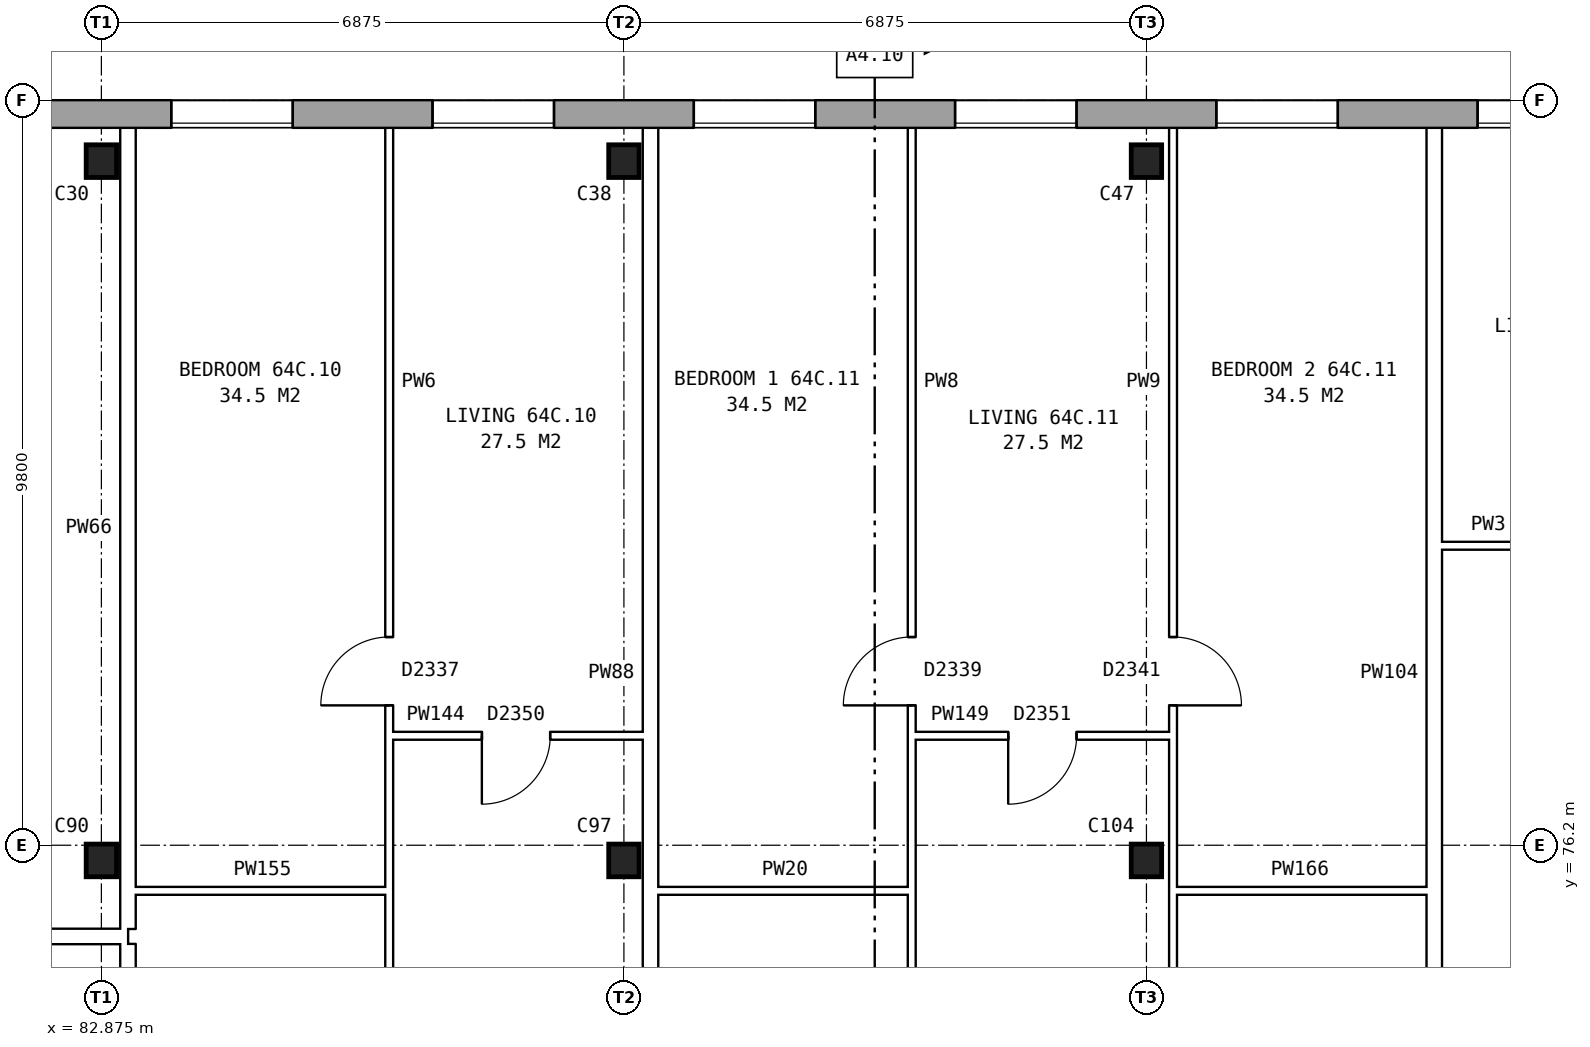
"""IFC4 building model, lengths in metres.
Left out: names, types, materials, properties, quantities, classifications, styles, units other than length and angle.
Written with IfcOpenShell. Run it as: python <this file> out.ifc"""

import sys

from ifc_helpers import new_model, si_unit, direction, frame, frame_2d, origin, origin_2d, place, context, subcontext, project, spatial, rectangle, i_section, extrude, element, fill, save


model = new_model("IFC4")
c1 = context("Model", 3, precision=1e-05, world=origin(), true_north=direction((0.0, 1.0)))
c2 = subcontext(c1, "Body", "Model", "MODEL_VIEW")
j1 = project(units=[si_unit("LENGTHUNIT", "METRE"), si_unit("PLANEANGLEUNIT", "RADIAN")], contexts=[c1])
p1 = place(None, origin())
s1 = spatial("IfcSite", under=j1, at=p1, CompositionType="ELEMENT")
p2 = place(p1, origin())
s2 = spatial("IfcBuilding", under=s1, at=p2, CompositionType="ELEMENT")
p3 = place(p2, frame((0.0, 0.0, 227.6)))
s3 = spatial("IfcBuildingStorey", under=s2, at=p3, CompositionType="ELEMENT", Elevation=227.6)
for number, where, z_axis, x_axis in (
    (1, (82.875, 76.0, 0.0), (0.0, 0.0, 1.0), (1.0, 0.0, 0.0)),
    (2, (89.75, 76.0, 0.0), (0.0, 0.0, 1.0), (1.0, 0.0, 0.0)),
    (3, (96.625, 76.0, 0.0), (0.0, 0.0, 1.0), (1.0, 0.0, 0.0)),
    (4, (82.875, 85.2, 0.0), (0.0, 0.0, 1.0), (1.0, 0.0, 0.0)),
    (5, (89.75, 85.2, 0.0), (0.0, 0.0, 1.0), (1.0, 0.0, 0.0)),
    (6, (96.625, 85.2, 0.0), (0.0, 0.0, 1.0), (1.0, 0.0, 0.0)),
):
    element("IfcColumn", number, at=place(p3, frame(where, z_axis=z_axis, x_axis=x_axis)), inside=s3, PredefinedType="COLUMN", context=c2, shape_type="SweptSolid", body=[
        extrude(i_section(OverallWidth=0.4, OverallDepth=0.43, WebThickness=0.04, FlangeThickness=0.04, at=origin_2d()), origin(), (0.0, 0.0, 1.0), 2.85),
    ])
p4 = place(p3, frame((131.05, 85.82, 0.0), z_axis=(0.0, 0.0, 1.0), x_axis=(-1.0, 0.0, 0.0)))
e7 = element("IfcWall", 7, at=p4, inside=s3, PredefinedType="STANDARD", context=c2, shape_type="SweptSolid", body=[
    extrude(rectangle(XDim=55.1, YDim=0.36, at=frame_2d((27.55, 0.0))), origin(), (0.0, 0.0, 1.0), 2.85),
])
p5 = place(p4, frame((0.969, 0.0, 0.8)))
e8 = element("IfcOpeningElement", 8, at=p5, cuts=e7, PredefinedType="OPENING", context=c2, shape_type="SweptSolid", body=[
    extrude(rectangle(XDim=1.6, YDim=1.8, at=frame_2d((0.8, 0.9))), frame((0.0, 0.19, 0.0), z_axis=(0.0, -1.0, 0.0), x_axis=(1.0, 0.0, 0.0)), (0.0, 0.0, 1.0), 0.38),
])
p6 = place(p4, frame((4.406, 0.0, 0.8)))
e9 = element("IfcOpeningElement", 9, at=p6, cuts=e7, PredefinedType="OPENING", context=c2, shape_type="SweptSolid", body=[
    extrude(rectangle(XDim=1.6, YDim=1.8, at=frame_2d((0.8, 0.9))), frame((0.0, 0.19, 0.0), z_axis=(0.0, -1.0, 0.0), x_axis=(1.0, 0.0, 0.0)), (0.0, 0.0, 1.0), 0.38),
])
p7 = place(p4, frame((7.844, 0.0, 0.8)))
e10 = element("IfcOpeningElement", 10, at=p7, cuts=e7, PredefinedType="OPENING", context=c2, shape_type="SweptSolid", body=[
    extrude(rectangle(XDim=1.6, YDim=1.8, at=frame_2d((0.8, 0.9))), frame((0.0, 0.19, 0.0), z_axis=(0.0, -1.0, 0.0), x_axis=(1.0, 0.0, 0.0)), (0.0, 0.0, 1.0), 0.38),
])
p8 = place(p4, frame((11.281, 0.0, 0.8)))
e11 = element("IfcOpeningElement", 11, at=p8, cuts=e7, PredefinedType="OPENING", context=c2, shape_type="SweptSolid", body=[
    extrude(rectangle(XDim=1.6, YDim=1.8, at=frame_2d((0.8, 0.9))), frame((0.0, 0.19, 0.0), z_axis=(0.0, -1.0, 0.0), x_axis=(1.0, 0.0, 0.0)), (0.0, 0.0, 1.0), 0.38),
])
p9 = place(p4, frame((14.719, 0.0, 0.8)))
e12 = element("IfcOpeningElement", 12, at=p9, cuts=e7, PredefinedType="OPENING", context=c2, shape_type="SweptSolid", body=[
    extrude(rectangle(XDim=1.6, YDim=1.8, at=frame_2d((0.8, 0.9))), frame((0.0, 0.19, 0.0), z_axis=(0.0, -1.0, 0.0), x_axis=(1.0, 0.0, 0.0)), (0.0, 0.0, 1.0), 0.38),
])
p10 = place(p4, frame((18.156, 0.0, 0.8)))
e13 = element("IfcOpeningElement", 13, at=p10, cuts=e7, PredefinedType="OPENING", context=c2, shape_type="SweptSolid", body=[
    extrude(rectangle(XDim=1.6, YDim=1.8, at=frame_2d((0.8, 0.9))), frame((0.0, 0.19, 0.0), z_axis=(0.0, -1.0, 0.0), x_axis=(1.0, 0.0, 0.0)), (0.0, 0.0, 1.0), 0.38),
])
p11 = place(p4, frame((21.594, 0.0, 0.8)))
e14 = element("IfcOpeningElement", 14, at=p11, cuts=e7, PredefinedType="OPENING", context=c2, shape_type="SweptSolid", body=[
    extrude(rectangle(XDim=1.6, YDim=1.8, at=frame_2d((0.8, 0.9))), frame((0.0, 0.19, 0.0), z_axis=(0.0, -1.0, 0.0), x_axis=(1.0, 0.0, 0.0)), (0.0, 0.0, 1.0), 0.38),
])
p12 = place(p4, frame((25.031, 0.0, 0.8)))
e15 = element("IfcOpeningElement", 15, at=p12, cuts=e7, PredefinedType="OPENING", context=c2, shape_type="SweptSolid", body=[
    extrude(rectangle(XDim=1.6, YDim=1.8, at=frame_2d((0.8, 0.9))), frame((0.0, 0.19, 0.0), z_axis=(0.0, -1.0, 0.0), x_axis=(1.0, 0.0, 0.0)), (0.0, 0.0, 1.0), 0.38),
])
p13 = place(p4, frame((28.469, 0.0, 0.8)))
e16 = element("IfcOpeningElement", 16, at=p13, cuts=e7, PredefinedType="OPENING", context=c2, shape_type="SweptSolid", body=[
    extrude(rectangle(XDim=1.6, YDim=1.8, at=frame_2d((0.8, 0.9))), frame((0.0, 0.19, 0.0), z_axis=(0.0, -1.0, 0.0), x_axis=(1.0, 0.0, 0.0)), (0.0, 0.0, 1.0), 0.38),
])
p14 = place(p4, frame((31.906, 0.0, 0.8)))
e17 = element("IfcOpeningElement", 17, at=p14, cuts=e7, PredefinedType="OPENING", context=c2, shape_type="SweptSolid", body=[
    extrude(rectangle(XDim=1.6, YDim=1.8, at=frame_2d((0.8, 0.9))), frame((0.0, 0.19, 0.0), z_axis=(0.0, -1.0, 0.0), x_axis=(1.0, 0.0, 0.0)), (0.0, 0.0, 1.0), 0.38),
])
p15 = place(p4, frame((35.344, 0.0, 0.8)))
e18 = element("IfcOpeningElement", 18, at=p15, cuts=e7, PredefinedType="OPENING", context=c2, shape_type="SweptSolid", body=[
    extrude(rectangle(XDim=1.6, YDim=1.8, at=frame_2d((0.8, 0.9))), frame((0.0, 0.19, 0.0), z_axis=(0.0, -1.0, 0.0), x_axis=(1.0, 0.0, 0.0)), (0.0, 0.0, 1.0), 0.38),
])
p16 = place(p4, frame((38.781, 0.0, 0.8)))
e19 = element("IfcOpeningElement", 19, at=p16, cuts=e7, PredefinedType="OPENING", context=c2, shape_type="SweptSolid", body=[
    extrude(rectangle(XDim=1.6, YDim=1.8, at=frame_2d((0.8, 0.9))), frame((0.0, 0.19, 0.0), z_axis=(0.0, -1.0, 0.0), x_axis=(1.0, 0.0, 0.0)), (0.0, 0.0, 1.0), 0.38),
])
p17 = place(p4, frame((42.219, 0.0, 0.8)))
e20 = element("IfcOpeningElement", 20, at=p17, cuts=e7, PredefinedType="OPENING", context=c2, shape_type="SweptSolid", body=[
    extrude(rectangle(XDim=1.6, YDim=1.8, at=frame_2d((0.8, 0.9))), frame((0.0, 0.19, 0.0), z_axis=(0.0, -1.0, 0.0), x_axis=(1.0, 0.0, 0.0)), (0.0, 0.0, 1.0), 0.38),
])
p18 = place(p4, frame((45.656, 0.0, 0.8)))
e21 = element("IfcOpeningElement", 21, at=p18, cuts=e7, PredefinedType="OPENING", context=c2, shape_type="SweptSolid", body=[
    extrude(rectangle(XDim=1.6, YDim=1.8, at=frame_2d((0.8, 0.9))), frame((0.0, 0.19, 0.0), z_axis=(0.0, -1.0, 0.0), x_axis=(1.0, 0.0, 0.0)), (0.0, 0.0, 1.0), 0.38),
])
p19 = place(p4, frame((49.094, 0.0, 0.8)))
e22 = element("IfcOpeningElement", 22, at=p19, cuts=e7, PredefinedType="OPENING", context=c2, shape_type="SweptSolid", body=[
    extrude(rectangle(XDim=1.6, YDim=1.8, at=frame_2d((0.8, 0.9))), frame((0.0, 0.19, 0.0), z_axis=(0.0, -1.0, 0.0), x_axis=(1.0, 0.0, 0.0)), (0.0, 0.0, 1.0), 0.38),
])
p20 = place(p4, frame((52.531, 0.0, 0.8)))
e23 = element("IfcOpeningElement", 23, at=p20, cuts=e7, PredefinedType="OPENING", context=c2, shape_type="SweptSolid", body=[
    extrude(rectangle(XDim=1.6, YDim=1.8, at=frame_2d((0.8, 0.9))), frame((0.0, 0.19, 0.0), z_axis=(0.0, -1.0, 0.0), x_axis=(1.0, 0.0, 0.0)), (0.0, 0.0, 1.0), 0.38),
])
p21 = place(p3, frame((75.64, 75.0, 0.0), z_axis=(0.0, 0.0, 1.0), x_axis=(1.0, 0.0, 0.0)))
e24 = element("IfcWall", 24, at=p21, inside=s3, PredefinedType="PARTITIONING", context=c2, shape_type="SweptSolid", body=[
    extrude(rectangle(XDim=7.585, YDim=0.2, at=frame_2d((3.792, 0.0))), origin(), (0.0, 0.0, 1.0), 2.85),
])
p22 = place(p21, frame((3.343, 0.0, 0.0)))
e25 = element("IfcOpeningElement", 25, at=p22, cuts=e24, PredefinedType="OPENING", context=c2, shape_type="SweptSolid", body=[
    extrude(rectangle(XDim=0.9, YDim=2.1, at=frame_2d((0.45, 1.05))), frame((0.0, 0.11, 0.0), z_axis=(0.0, -1.0, 0.0), x_axis=(1.0, 0.0, 0.0)), (0.0, 0.0, 1.0), 0.22),
])
for number, where, z_axis, x_axis in (
    (26, (83.325, 75.6, 0.0), (0.0, 0.0, 1.0), (1.0, 0.0, 0.0)),
    (27, (90.2, 75.6, 0.0), (0.0, 0.0, 1.0), (1.0, 0.0, 0.0)),
):
    element("IfcWall", number, at=place(p3, frame(where, z_axis=z_axis, x_axis=x_axis)), inside=s3, PredefinedType="PARTITIONING", context=c2, shape_type="SweptSolid", body=[
        extrude(rectangle(XDim=3.337, YDim=0.1, at=frame_2d((1.668, 0.0))), origin(), (0.0, 0.0, 1.0), 2.85),
    ])
p23 = place(p3, frame((96.975, 75.6, 0.0), z_axis=(0.0, 0.0, 1.0), x_axis=(1.0, 0.0, 0.0)))
e28 = element("IfcWall", 28, at=p23, inside=s3, PredefinedType="PARTITIONING", context=c2, shape_type="SweptSolid", body=[
    extrude(rectangle(XDim=3.337, YDim=0.1, at=frame_2d((1.668, 0.0))), origin(), (0.0, 0.0, 1.0), 2.85),
])
p24 = place(p3, frame((86.662, 77.64, 0.0), z_axis=(0.0, 0.0, 1.0), x_axis=(1.0, 0.0, 0.0)))
e29 = element("IfcWall", 29, at=p24, inside=s3, PredefinedType="PARTITIONING", context=c2, shape_type="SweptSolid", body=[
    extrude(rectangle(XDim=3.338, YDim=0.1, at=frame_2d((1.669, 0.0))), origin(), (0.0, 0.0, 1.0), 2.85),
])
p25 = place(p24, frame((1.219, 0.0, 0.0)))
e30 = element("IfcOpeningElement", 30, at=p25, cuts=e29, PredefinedType="OPENING", context=c2, shape_type="SweptSolid", body=[
    extrude(rectangle(XDim=0.9, YDim=2.1, at=frame_2d((0.45, 1.05))), frame((0.0, 0.06, 0.0), z_axis=(0.0, -1.0, 0.0), x_axis=(1.0, 0.0, 0.0)), (0.0, 0.0, 1.0), 0.12),
])
p26 = place(p3, frame((93.537, 77.64, 0.0), z_axis=(0.0, 0.0, 1.0), x_axis=(1.0, 0.0, 0.0)))
e31 = element("IfcWall", 31, at=p26, inside=s3, PredefinedType="PARTITIONING", context=c2, shape_type="SweptSolid", body=[
    extrude(rectangle(XDim=3.438, YDim=0.1, at=frame_2d((1.719, 0.0))), origin(), (0.0, 0.0, 1.0), 2.85),
])
p27 = place(p26, frame((1.269, 0.0, 0.0)))
e32 = element("IfcOpeningElement", 32, at=p27, cuts=e31, PredefinedType="OPENING", context=c2, shape_type="SweptSolid", body=[
    extrude(rectangle(XDim=0.9, YDim=2.1, at=frame_2d((0.45, 1.05))), frame((0.0, 0.06, 0.0), z_axis=(0.0, -1.0, 0.0), x_axis=(1.0, 0.0, 0.0)), (0.0, 0.0, 1.0), 0.12),
])
p28 = place(p3, frame((100.512, 80.14, 0.0), z_axis=(0.0, 0.0, 1.0), x_axis=(1.0, 0.0, 0.0)))
e33 = element("IfcWall", 33, at=p28, inside=s3, PredefinedType="PARTITIONING", context=c2, shape_type="SweptSolid", body=[
    extrude(rectangle(XDim=3.338, YDim=0.1, at=frame_2d((1.669, 0.0))), origin(), (0.0, 0.0, 1.0), 2.85),
])
p29 = place(p28, frame((1.219, 0.0, 0.0)))
e34 = element("IfcOpeningElement", 34, at=p29, cuts=e33, PredefinedType="OPENING", context=c2, shape_type="SweptSolid", body=[
    extrude(rectangle(XDim=0.9, YDim=2.1, at=frame_2d((0.45, 1.05))), frame((0.0, 0.06, 0.0), z_axis=(0.0, -1.0, 0.0), x_axis=(1.0, 0.0, 0.0)), (0.0, 0.0, 1.0), 0.12),
])
p30 = place(p3, frame((83.225, 71.3, 0.0), z_axis=(0.0, 0.0, 1.0), x_axis=(0.0, 1.0, 0.0)))
e35 = element("IfcWall", 35, at=p30, inside=s3, PredefinedType="PARTITIONING", context=c2, shape_type="SweptSolid", body=[
    extrude(rectangle(XDim=3.6, YDim=0.2, at=frame_2d((1.8, 0.0))), origin(), (0.0, 0.0, 1.0), 2.85),
])
p31 = place(p3, frame((83.225, 75.1, 0.0), z_axis=(0.0, 0.0, 1.0), x_axis=(0.0, 1.0, 0.0)))
e36 = element("IfcWall", 36, at=p31, inside=s3, PredefinedType="PARTITIONING", context=c2, shape_type="SweptSolid", body=[
    extrude(rectangle(XDim=10.54, YDim=0.2, at=frame_2d((5.27, 0.0))), origin(), (0.0, 0.0, 1.0), 2.85),
])
p32 = place(p3, frame((86.662, 71.3, 0.0), z_axis=(0.0, 0.0, 1.0), x_axis=(0.0, 1.0, 0.0)))
e37 = element("IfcWall", 37, at=p32, inside=s3, PredefinedType="PARTITIONING", context=c2, shape_type="SweptSolid", body=[
    extrude(rectangle(XDim=14.34, YDim=0.1, at=frame_2d((7.17, 0.0))), origin(), (0.0, 0.0, 1.0), 2.85),
])
p33 = place(p32, frame((6.74, 0.0, 0.0)))
e38 = element("IfcOpeningElement", 38, at=p33, cuts=e37, PredefinedType="OPENING", context=c2, shape_type="SweptSolid", body=[
    extrude(rectangle(XDim=0.9, YDim=2.1, at=frame_2d((0.45, 1.05))), frame((0.0, 0.06, 0.0), z_axis=(0.0, -1.0, 0.0), x_axis=(1.0, 0.0, 0.0)), (0.0, 0.0, 1.0), 0.12),
])
p34 = place(p32, frame((0.4, 0.0, 0.0)))
e39 = element("IfcOpeningElement", 39, at=p34, cuts=e37, PredefinedType="OPENING", context=c2, shape_type="SweptSolid", body=[
    extrude(rectangle(XDim=0.9, YDim=2.1, at=frame_2d((0.45, 1.05))), frame((0.0, 0.06, 0.0), z_axis=(0.0, -1.0, 0.0), x_axis=(1.0, 0.0, 0.0)), (0.0, 0.0, 1.0), 0.12),
])
p35 = place(p3, frame((90.1, 71.3, 0.0), z_axis=(0.0, 0.0, 1.0), x_axis=(0.0, 1.0, 0.0)))
e40 = element("IfcWall", 40, at=p35, inside=s3, PredefinedType="PARTITIONING", context=c2, shape_type="SweptSolid", body=[
    extrude(rectangle(XDim=14.34, YDim=0.2, at=frame_2d((7.17, 0.0))), origin(), (0.0, 0.0, 1.0), 2.85),
])
p36 = place(p3, frame((93.537, 71.3, 0.0), z_axis=(0.0, 0.0, 1.0), x_axis=(0.0, 1.0, 0.0)))
e41 = element("IfcWall", 41, at=p36, inside=s3, PredefinedType="PARTITIONING", context=c2, shape_type="SweptSolid", body=[
    extrude(rectangle(XDim=14.34, YDim=0.1, at=frame_2d((7.17, 0.0))), origin(), (0.0, 0.0, 1.0), 2.85),
])
p37 = place(p36, frame((6.74, 0.0, 0.0)))
e42 = element("IfcOpeningElement", 42, at=p37, cuts=e41, PredefinedType="OPENING", context=c2, shape_type="SweptSolid", body=[
    extrude(rectangle(XDim=0.9, YDim=2.1, at=frame_2d((0.45, 1.05))), frame((0.0, 0.06, 0.0), z_axis=(0.0, -1.0, 0.0), x_axis=(1.0, 0.0, 0.0)), (0.0, 0.0, 1.0), 0.12),
])
p38 = place(p36, frame((0.4, 0.0, 0.0)))
e43 = element("IfcOpeningElement", 43, at=p38, cuts=e41, PredefinedType="OPENING", context=c2, shape_type="SweptSolid", body=[
    extrude(rectangle(XDim=0.9, YDim=2.1, at=frame_2d((0.45, 1.05))), frame((0.0, 0.06, 0.0), z_axis=(0.0, -1.0, 0.0), x_axis=(1.0, 0.0, 0.0)), (0.0, 0.0, 1.0), 0.12),
])
p39 = place(p3, frame((96.975, 71.3, 0.0), z_axis=(0.0, 0.0, 1.0), x_axis=(0.0, 1.0, 0.0)))
e44 = element("IfcWall", 44, at=p39, inside=s3, PredefinedType="PARTITIONING", context=c2, shape_type="SweptSolid", body=[
    extrude(rectangle(XDim=14.34, YDim=0.1, at=frame_2d((7.17, 0.0))), origin(), (0.0, 0.0, 1.0), 2.85),
])
p40 = place(p39, frame((6.74, 0.0, 0.0)))
e45 = element("IfcOpeningElement", 45, at=p40, cuts=e44, PredefinedType="OPENING", context=c2, shape_type="SweptSolid", body=[
    extrude(rectangle(XDim=0.9, YDim=2.1, at=frame_2d((0.45, 1.05))), frame((0.0, 0.06, 0.0), z_axis=(0.0, -1.0, 0.0), x_axis=(1.0, 0.0, 0.0)), (0.0, 0.0, 1.0), 0.12),
])
p41 = place(p39, frame((0.4, 0.0, 0.0)))
e46 = element("IfcOpeningElement", 46, at=p41, cuts=e44, PredefinedType="OPENING", context=c2, shape_type="SweptSolid", body=[
    extrude(rectangle(XDim=0.9, YDim=2.1, at=frame_2d((0.45, 1.05))), frame((0.0, 0.06, 0.0), z_axis=(0.0, -1.0, 0.0), x_axis=(1.0, 0.0, 0.0)), (0.0, 0.0, 1.0), 0.12),
])
p42 = place(p3, frame((100.412, 71.3, 0.0), z_axis=(0.0, 0.0, 1.0), x_axis=(0.0, 1.0, 0.0)))
e47 = element("IfcWall", 47, at=p42, inside=s3, PredefinedType="PARTITIONING", context=c2, shape_type="SweptSolid", body=[
    extrude(rectangle(XDim=14.34, YDim=0.2, at=frame_2d((7.17, 0.0))), origin(), (0.0, 0.0, 1.0), 2.85),
])
p43 = place(p13, origin())
e48 = element("IfcWindow", 48, at=p43, inside=s3, PartitioningType="SINGLE_PANEL", PredefinedType="WINDOW", context=c2, shape_type="SweptSolid", body=[
    extrude(rectangle(XDim=1.6, YDim=1.8, at=frame_2d((0.8, 0.9))), frame((0.0, 0.15, 0.0), z_axis=(0.0, -1.0, 0.0), x_axis=(1.0, 0.0, 0.0)), (0.0, 0.0, 1.0), 0.06),
])
fill(e16, e48)
p44 = place(p14, origin())
e49 = element("IfcWindow", 49, at=p44, inside=s3, PartitioningType="SINGLE_PANEL", PredefinedType="WINDOW", context=c2, shape_type="SweptSolid", body=[
    extrude(rectangle(XDim=1.6, YDim=1.8, at=frame_2d((0.8, 0.9))), frame((0.0, 0.15, 0.0), z_axis=(0.0, -1.0, 0.0), x_axis=(1.0, 0.0, 0.0)), (0.0, 0.0, 1.0), 0.06),
])
fill(e17, e49)
p45 = place(p15, origin())
e50 = element("IfcWindow", 50, at=p45, inside=s3, PartitioningType="SINGLE_PANEL", PredefinedType="WINDOW", context=c2, shape_type="SweptSolid", body=[
    extrude(rectangle(XDim=1.6, YDim=1.8, at=frame_2d((0.8, 0.9))), frame((0.0, 0.15, 0.0), z_axis=(0.0, -1.0, 0.0), x_axis=(1.0, 0.0, 0.0)), (0.0, 0.0, 1.0), 0.06),
])
fill(e18, e50)
p46 = place(p16, origin())
e51 = element("IfcWindow", 51, at=p46, inside=s3, PartitioningType="SINGLE_PANEL", PredefinedType="WINDOW", context=c2, shape_type="SweptSolid", body=[
    extrude(rectangle(XDim=1.6, YDim=1.8, at=frame_2d((0.8, 0.9))), frame((0.0, 0.15, 0.0), z_axis=(0.0, -1.0, 0.0), x_axis=(1.0, 0.0, 0.0)), (0.0, 0.0, 1.0), 0.06),
])
fill(e19, e51)
p47 = place(p17, origin())
e52 = element("IfcWindow", 52, at=p47, inside=s3, PartitioningType="SINGLE_PANEL", PredefinedType="WINDOW", context=c2, shape_type="SweptSolid", body=[
    extrude(rectangle(XDim=1.6, YDim=1.8, at=frame_2d((0.8, 0.9))), frame((0.0, 0.15, 0.0), z_axis=(0.0, -1.0, 0.0), x_axis=(1.0, 0.0, 0.0)), (0.0, 0.0, 1.0), 0.06),
])
fill(e20, e52)
p48 = place(p18, origin())
e53 = element("IfcWindow", 53, at=p48, inside=s3, PartitioningType="SINGLE_PANEL", PredefinedType="WINDOW", context=c2, shape_type="SweptSolid", body=[
    extrude(rectangle(XDim=1.6, YDim=1.8, at=frame_2d((0.8, 0.9))), frame((0.0, 0.15, 0.0), z_axis=(0.0, -1.0, 0.0), x_axis=(1.0, 0.0, 0.0)), (0.0, 0.0, 1.0), 0.06),
])
fill(e21, e53)
p49 = place(p33, origin())
e54 = element("IfcDoor", 54, at=p49, inside=s3, OperationType="SINGLE_SWING_LEFT", PredefinedType="DOOR", context=c2, shape_type="SweptSolid", body=[
    extrude(rectangle(XDim=0.9, YDim=2.1, at=frame_2d((0.45, 1.05))), frame((0.0, 0.025, 0.0), z_axis=(0.0, -1.0, 0.0), x_axis=(1.0, 0.0, 0.0)), (0.0, 0.0, 1.0), 0.05),
])
fill(e38, e54)
p50 = place(p25, frame((0.9, 0.0, 0.0), z_axis=(0.0, 0.0, 1.0), x_axis=(-1.0, 0.0, 0.0)))
e55 = element("IfcDoor", 55, at=p50, inside=s3, OperationType="SINGLE_SWING_RIGHT", PredefinedType="DOOR", context=c2, shape_type="SweptSolid", body=[
    extrude(rectangle(XDim=0.9, YDim=2.1, at=frame_2d((0.45, 1.05))), frame((0.0, 0.025, 0.0), z_axis=(0.0, -1.0, 0.0), x_axis=(1.0, 0.0, 0.0)), (0.0, 0.0, 1.0), 0.05),
])
fill(e30, e55)
p51 = place(p37, origin())
e56 = element("IfcDoor", 56, at=p51, inside=s3, OperationType="SINGLE_SWING_LEFT", PredefinedType="DOOR", context=c2, shape_type="SweptSolid", body=[
    extrude(rectangle(XDim=0.9, YDim=2.1, at=frame_2d((0.45, 1.05))), frame((0.0, 0.025, 0.0), z_axis=(0.0, -1.0, 0.0), x_axis=(1.0, 0.0, 0.0)), (0.0, 0.0, 1.0), 0.05),
])
fill(e42, e56)
p52 = place(p40, frame((0.9, 0.0, 0.0), z_axis=(0.0, 0.0, 1.0), x_axis=(-1.0, 0.0, 0.0)))
e57 = element("IfcDoor", 57, at=p52, inside=s3, OperationType="SINGLE_SWING_RIGHT", PredefinedType="DOOR", context=c2, shape_type="SweptSolid", body=[
    extrude(rectangle(XDim=0.9, YDim=2.1, at=frame_2d((0.45, 1.05))), frame((0.0, 0.025, 0.0), z_axis=(0.0, -1.0, 0.0), x_axis=(1.0, 0.0, 0.0)), (0.0, 0.0, 1.0), 0.05),
])
fill(e45, e57)
p53 = place(p27, frame((0.9, 0.0, 0.0), z_axis=(0.0, 0.0, 1.0), x_axis=(-1.0, 0.0, 0.0)))
e58 = element("IfcDoor", 58, at=p53, inside=s3, OperationType="SINGLE_SWING_RIGHT", PredefinedType="DOOR", context=c2, shape_type="SweptSolid", body=[
    extrude(rectangle(XDim=0.9, YDim=2.1, at=frame_2d((0.45, 1.05))), frame((0.0, 0.025, 0.0), z_axis=(0.0, -1.0, 0.0), x_axis=(1.0, 0.0, 0.0)), (0.0, 0.0, 1.0), 0.05),
])
fill(e32, e58)
save(model, sys.argv[1])
